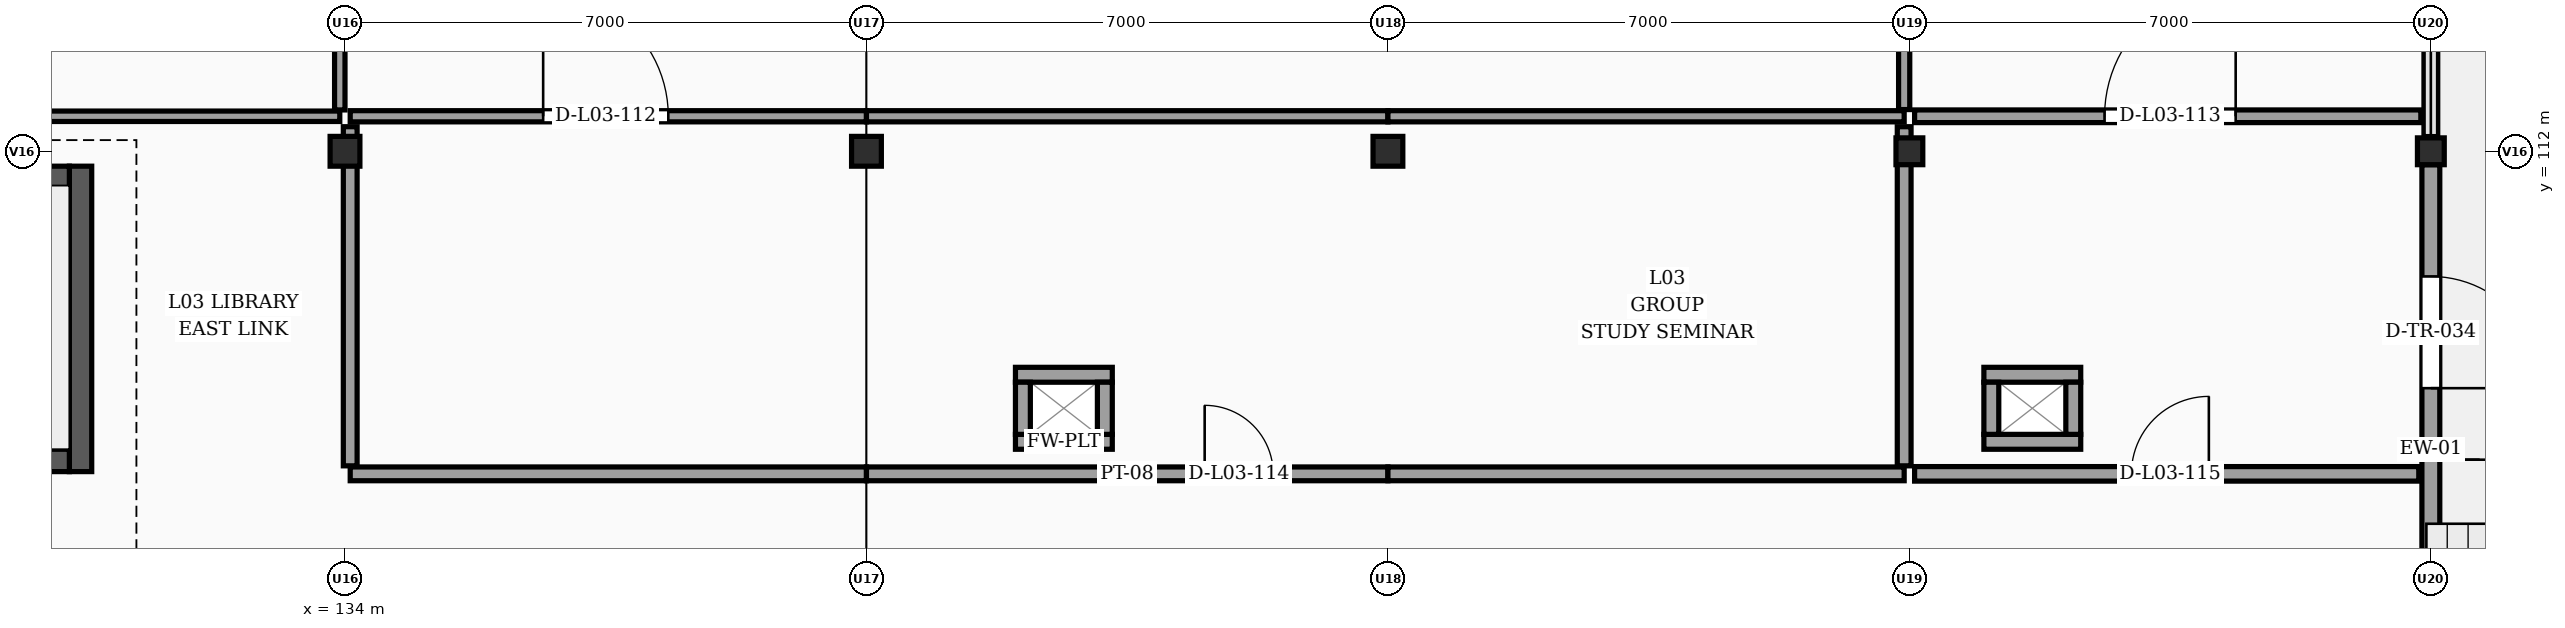
"""IFC4 building model, lengths in metres.
Left out: names, types, materials, properties, quantities, classifications, styles, units other than length and angle.
Written with IfcOpenShell. Run it as: python <this file> out.ifc"""

import sys

from ifc_helpers import new_model, si_unit, direction, frame, frame_2d, origin, origin_2d, place, context, subcontext, project, spatial, rectangle, extrude, element, fill, save


model = new_model("IFC4")
c1 = context("Model", 3, precision=1e-05, world=origin(), true_north=direction((0.0, 1.0)))
c2 = subcontext(c1, "Body", "Model", "MODEL_VIEW")
j1 = project(units=[si_unit("LENGTHUNIT", "METRE"), si_unit("PLANEANGLEUNIT", "RADIAN")], contexts=[c1])
p1 = place(None, origin())
s1 = spatial("IfcSite", under=j1, at=p1, CompositionType="ELEMENT")
p2 = place(p1, origin())
s2 = spatial("IfcBuilding", under=s1, at=p2, CompositionType="ELEMENT")
p3 = place(p2, frame((0.0, 0.0, 12.3)))
s3 = spatial("IfcBuildingStorey", under=s2, at=p3, CompositionType="ELEMENT", Elevation=12.3)
for number, where, z_axis, x_axis in (
    (1, (134.0, 112.0, 0.0), (0.0, 0.0, 1.0), (1.0, 0.0, 0.0)),
    (2, (141.0, 112.0, 0.0), (0.0, 0.0, 1.0), (1.0, 0.0, 0.0)),
    (3, (148.0, 112.0, 0.0), (0.0, 0.0, 1.0), (1.0, 0.0, 0.0)),
):
    element("IfcColumn", number, at=place(p3, frame(where, z_axis=z_axis, x_axis=x_axis)), inside=s3, PredefinedType="COLUMN", context=c2, shape_type="SweptSolid", body=[
        extrude(rectangle(XDim=0.4, YDim=0.4, at=origin_2d()), origin(), (0.0, 0.0, 1.0), 3.9),
    ])
for number, where, z_axis, x_axis in (
    (4, (155.0, 112.0, 0.0), (0.0, 0.0, 1.0), (1.0, 0.0, 0.0)),
    (5, (162.0, 112.0, 0.0), (0.0, 0.0, 1.0), (1.0, 0.0, 0.0)),
):
    element("IfcColumn", number, at=place(p3, frame(where, z_axis=z_axis, x_axis=x_axis)), inside=s3, PredefinedType="COLUMN", context=c2, shape_type="SweptSolid", body=[
        extrude(rectangle(XDim=0.36, YDim=0.36, at=origin_2d()), origin(), (0.0, 0.0, 1.0), 3.9),
    ])
p4 = place(p3, frame((162.0, 119.82, 0.0), z_axis=(0.0, 0.0, 1.0), x_axis=(0.0, -1.0, 0.0)))
e6 = element("IfcWall", 6, at=p4, inside=s3, PredefinedType="SOLIDWALL", context=c2, shape_type="SweptSolid", body=[
    extrude(rectangle(XDim=7.64, YDim=0.185, at=frame_2d((3.82, 0.0))), origin(), (0.0, 0.0, 1.0), 0.95),
])
p5 = place(p3, frame((162.0, 111.82, 0.0), z_axis=(0.0, 0.0, 1.0), x_axis=(0.0, -1.0, 0.0)))
e7 = element("IfcWall", 7, at=p5, inside=s3, PredefinedType="SOLIDWALL", context=c2, shape_type="SweptSolid", body=[
    extrude(rectangle(XDim=7.64, YDim=0.24, at=frame_2d((3.82, 0.0))), origin(), (0.0, 0.0, 1.0), 3.65),
])
p6 = place(p5, frame((1.5, 0.0, 0.0)))
e8 = element("IfcOpeningElement", 8, at=p6, cuts=e7, PredefinedType="OPENING", context=c2, shape_type="SweptSolid", body=[
    extrude(rectangle(XDim=1.5, YDim=2.15, at=frame_2d((0.75, 1.075))), frame((0.0, 0.13, 0.0), z_axis=(0.0, -1.0, 0.0), x_axis=(1.0, 0.0, 0.0)), (0.0, 0.0, 1.0), 0.26),
])
p7 = place(p3, frame((130.45, 111.8, 0.0), z_axis=(0.0, 0.0, 1.0), x_axis=(0.0, -1.0, 0.0)))
e9 = element("IfcWall", 9, at=p7, inside=s3, PredefinedType="SHEAR", context=c2, shape_type="SweptSolid", body=[
    extrude(rectangle(XDim=4.1, YDim=0.3, at=frame_2d((2.05, 0.0))), origin(), (0.0, 0.0, 1.0), 3.65),
])
p8 = place(p3, frame((123.5, 107.85, 0.0), z_axis=(0.0, 0.0, 1.0), x_axis=(1.0, 0.0, 0.0)))
e10 = element("IfcWall", 10, at=p8, inside=s3, PredefinedType="SHEAR", context=c2, shape_type="SweptSolid", body=[
    extrude(rectangle(XDim=6.8, YDim=0.3, at=frame_2d((3.4, 0.0))), origin(), (0.0, 0.0, 1.0), 3.65),
])
p9 = place(p8, frame((0.3, 0.0, 0.0)))
e11 = element("IfcOpeningElement", 11, at=p9, cuts=e10, PredefinedType="OPENING", context=c2, shape_type="SweptSolid", body=[
    extrude(rectangle(XDim=1.1, YDim=2.15, at=frame_2d((0.55, 1.075))), frame((0.0, 0.16, 0.0), z_axis=(0.0, -1.0, 0.0), x_axis=(1.0, 0.0, 0.0)), (0.0, 0.0, 1.0), 0.32),
])
p10 = place(p3, frame((130.3, 111.65, 0.0), z_axis=(0.0, 0.0, 1.0), x_axis=(-1.0, 0.0, 0.0)))
e12 = element("IfcWall", 12, at=p10, inside=s3, PredefinedType="SHEAR", context=c2, shape_type="SweptSolid", body=[
    extrude(rectangle(XDim=6.8, YDim=0.3, at=frame_2d((3.4, 0.0))), origin(), (0.0, 0.0, 1.0), 3.65),
])
for number, where, z_axis, x_axis in (
    (13, (144.3, 108.1, 0.0), (0.0, 0.0, 1.0), (-1.0, 0.0, 0.0)),
    (14, (143.0, 109.0, 0.0), (0.0, 0.0, 1.0), (1.0, 0.0, 0.0)),
):
    element("IfcWall", number, at=place(p3, frame(where, z_axis=z_axis, x_axis=x_axis)), inside=s3, PredefinedType="PARTITIONING", context=c2, shape_type="SweptSolid", body=[
        extrude(rectangle(XDim=1.3, YDim=0.2, at=frame_2d((0.65, 0.0))), origin(), (0.0, 0.0, 1.0), 3.65),
    ])
p11 = place(p3, frame((143.1, 108.2, 0.0), z_axis=(0.0, 0.0, 1.0), x_axis=(0.0, 1.0, 0.0)))
e15 = element("IfcWall", 15, at=p11, inside=s3, PredefinedType="PARTITIONING", context=c2, shape_type="SweptSolid", body=[
    extrude(rectangle(XDim=0.7, YDim=0.2, at=frame_2d((0.35, 0.0))), origin(), (0.0, 0.0, 1.0), 3.245),
])
p12 = place(p3, frame((144.2, 108.9, 0.0), z_axis=(0.0, 0.0, 1.0), x_axis=(0.0, -1.0, 0.0)))
e16 = element("IfcWall", 16, at=p12, inside=s3, PredefinedType="PARTITIONING", context=c2, shape_type="SweptSolid", body=[
    extrude(rectangle(XDim=0.7, YDim=0.2, at=frame_2d((0.35, 0.0))), origin(), (0.0, 0.0, 1.0), 3.65),
])
for number, where, z_axis, x_axis in (
    (17, (157.3, 108.1, 0.0), (0.0, 0.0, 1.0), (-1.0, 0.0, 0.0)),
    (18, (156.0, 109.0, 0.0), (0.0, 0.0, 1.0), (1.0, 0.0, 0.0)),
):
    element("IfcWall", number, at=place(p3, frame(where, z_axis=z_axis, x_axis=x_axis)), inside=s3, PredefinedType="PARTITIONING", context=c2, shape_type="SweptSolid", body=[
        extrude(rectangle(XDim=1.3, YDim=0.2, at=frame_2d((0.65, 0.0))), origin(), (0.0, 0.0, 1.0), 3.65),
    ])
p13 = place(p3, frame((156.1, 108.2, 0.0), z_axis=(0.0, 0.0, 1.0), x_axis=(0.0, 1.0, 0.0)))
e19 = element("IfcWall", 19, at=p13, inside=s3, PredefinedType="PARTITIONING", context=c2, shape_type="SweptSolid", body=[
    extrude(rectangle(XDim=0.7, YDim=0.2, at=frame_2d((0.35, 0.0))), origin(), (0.0, 0.0, 1.0), 3.65),
])
p14 = place(p3, frame((157.2, 108.9, 0.0), z_axis=(0.0, 0.0, 1.0), x_axis=(0.0, -1.0, 0.0)))
e20 = element("IfcWall", 20, at=p14, inside=s3, PredefinedType="PARTITIONING", context=c2, shape_type="SweptSolid", body=[
    extrude(rectangle(XDim=0.7, YDim=0.2, at=frame_2d((0.35, 0.0))), origin(), (0.0, 0.0, 1.0), 3.248),
])
p15 = place(p3, frame((127.0, 112.47, 0.0), z_axis=(0.0, 0.0, 1.0), x_axis=(1.0, 0.0, 0.0)))
e21 = element("IfcWall", 21, at=p15, inside=s3, PredefinedType="PARTITIONING", context=c2, shape_type="SweptSolid", body=[
    extrude(rectangle(XDim=6.93, YDim=0.14, at=frame_2d((3.465, 0.0))), origin(), (0.0, 0.0, 1.0), 3.65),
])
p16 = place(p3, frame((133.93, 112.555, 0.0), z_axis=(0.0, 0.0, 1.0), x_axis=(0.0, 1.0, 0.0)))
e22 = element("IfcWall", 22, at=p16, inside=s3, PredefinedType="PARTITIONING", context=c2, shape_type="SweptSolid", body=[
    extrude(rectangle(XDim=8.275, YDim=0.14, at=frame_2d((4.137, 0.0))), origin(), (0.0, 0.0, 1.0), 3.085),
])
p17 = place(p3, frame((134.07, 112.47, 0.0), z_axis=(0.0, 0.0, 1.0), x_axis=(1.0, 0.0, 0.0)))
e23 = element("IfcWall", 23, at=p17, inside=s3, PredefinedType="PARTITIONING", context=c2, shape_type="SweptSolid", body=[
    extrude(rectangle(XDim=6.93, YDim=0.15, at=frame_2d((3.465, 0.0))), origin(), (0.0, 0.0, 1.0), 3.65),
])
p18 = place(p17, frame((2.59, 0.0, 0.0)))
e24 = element("IfcOpeningElement", 24, at=p18, cuts=e23, PredefinedType="OPENING", context=c2, shape_type="SweptSolid", body=[
    extrude(rectangle(XDim=1.68, YDim=2.2, at=frame_2d((0.84, 1.1))), frame((0.0, 0.085, 0.0), z_axis=(0.0, -1.0, 0.0), x_axis=(1.0, 0.0, 0.0)), (0.0, 0.0, 1.0), 0.17),
])
p19 = place(p3, frame((141.0, 112.47, 0.0), z_axis=(0.0, 0.0, 1.0), x_axis=(1.0, 0.0, 0.0)))
e25 = element("IfcWall", 25, at=p19, inside=s3, PredefinedType="PARTITIONING", context=c2, shape_type="SweptSolid", body=[
    extrude(rectangle(XDim=7.0, YDim=0.15, at=frame_2d((3.5, 0.0))), origin(), (0.0, 0.0, 1.0), 3.65),
])
p20 = place(p3, frame((148.0, 112.47, 0.0), z_axis=(0.0, 0.0, 1.0), x_axis=(1.0, 0.0, 0.0)))
e26 = element("IfcWall", 26, at=p20, inside=s3, PredefinedType="PARTITIONING", context=c2, shape_type="SweptSolid", body=[
    extrude(rectangle(XDim=6.93, YDim=0.15, at=frame_2d((3.465, 0.0))), origin(), (0.0, 0.0, 1.0), 3.65),
])
p21 = place(p3, frame((154.93, 112.56, 0.0), z_axis=(0.0, 0.0, 1.0), x_axis=(0.0, 1.0, 0.0)))
e27 = element("IfcWall", 27, at=p21, inside=s3, PredefinedType="PARTITIONING", context=c2, shape_type="SweptSolid", body=[
    extrude(rectangle(XDim=9.536, YDim=0.15, at=frame_2d((4.768, 0.0))), origin(), (0.0, 0.0, 1.0), 3.088),
])
p22 = place(p3, frame((155.07, 112.47, 0.0), z_axis=(0.0, 0.0, 1.0), x_axis=(1.0, 0.0, 0.0)))
e28 = element("IfcWall", 28, at=p22, inside=s3, PredefinedType="PARTITIONING", context=c2, shape_type="SweptSolid", body=[
    extrude(rectangle(XDim=6.795, YDim=0.17, at=frame_2d((3.398, 0.0))), origin(), (0.0, 0.0, 1.0), 3.65),
])
p23 = place(p22, frame((2.55, 0.0, 0.0)))
e29 = element("IfcOpeningElement", 29, at=p23, cuts=e28, PredefinedType="OPENING", context=c2, shape_type="SweptSolid", body=[
    extrude(rectangle(XDim=1.76, YDim=2.2, at=frame_2d((0.88, 1.1))), frame((0.0, 0.095, 0.0), z_axis=(0.0, -1.0, 0.0), x_axis=(1.0, 0.0, 0.0)), (0.0, 0.0, 1.0), 0.19),
])
p24 = place(p3, frame((134.07, 107.67, 0.0), z_axis=(0.0, 0.0, 1.0), x_axis=(1.0, 0.0, 0.0)))
e30 = element("IfcWall", 30, at=p24, inside=s3, PredefinedType="PARTITIONING", context=c2, shape_type="SweptSolid", body=[
    extrude(rectangle(XDim=6.93, YDim=0.185, at=frame_2d((3.465, 0.0))), origin(), (0.0, 0.0, 1.0), 3.65),
])
p25 = place(p3, frame((141.0, 107.67, 0.0), z_axis=(0.0, 0.0, 1.0), x_axis=(1.0, 0.0, 0.0)))
e31 = element("IfcWall", 31, at=p25, inside=s3, PredefinedType="PARTITIONING", context=c2, shape_type="SweptSolid", body=[
    extrude(rectangle(XDim=7.0, YDim=0.185, at=frame_2d((3.5, 0.0))), origin(), (0.0, 0.0, 1.0), 3.65),
])
p26 = place(p25, frame((4.54, 0.0, 0.0)))
e32 = element("IfcOpeningElement", 32, at=p26, cuts=e31, PredefinedType="OPENING", context=c2, shape_type="SweptSolid", body=[
    extrude(rectangle(XDim=0.92, YDim=2.2, at=frame_2d((0.46, 1.1))), frame((0.0, 0.103, 0.0), z_axis=(0.0, -1.0, 0.0), x_axis=(1.0, 0.0, 0.0)), (0.0, 0.0, 1.0), 0.205),
])
p27 = place(p3, frame((148.0, 107.67, 0.0), z_axis=(0.0, 0.0, 1.0), x_axis=(1.0, 0.0, 0.0)))
e33 = element("IfcWall", 33, at=p27, inside=s3, PredefinedType="PARTITIONING", context=c2, shape_type="SweptSolid", body=[
    extrude(rectangle(XDim=6.93, YDim=0.185, at=frame_2d((3.465, 0.0))), origin(), (0.0, 0.0, 1.0), 3.65),
])
p28 = place(p3, frame((134.07, 107.778, 0.0), z_axis=(0.0, 0.0, 1.0), x_axis=(0.0, 1.0, 0.0)))
e34 = element("IfcWall", 34, at=p28, inside=s3, PredefinedType="PARTITIONING", context=c2, shape_type="SweptSolid", body=[
    extrude(rectangle(XDim=4.552, YDim=0.185, at=frame_2d((2.276, 0.0))), origin(), (0.0, 0.0, 1.0), 3.085),
])
p29 = place(p3, frame((154.93, 107.778, 0.0), z_axis=(0.0, 0.0, 1.0), x_axis=(0.0, 1.0, 0.0)))
e35 = element("IfcWall", 35, at=p29, inside=s3, PredefinedType="PARTITIONING", context=c2, shape_type="SweptSolid", body=[
    extrude(rectangle(XDim=4.552, YDim=0.185, at=frame_2d((2.276, 0.0))), origin(), (0.0, 0.0, 1.0), 3.088),
])
p30 = place(p3, frame((155.07, 107.67, 0.0), z_axis=(0.0, 0.0, 1.0), x_axis=(1.0, 0.0, 0.0)))
e36 = element("IfcWall", 36, at=p30, inside=s3, PredefinedType="PARTITIONING", context=c2, shape_type="SweptSolid", body=[
    extrude(rectangle(XDim=6.768, YDim=0.195, at=frame_2d((3.384, 0.0))), origin(), (0.0, 0.0, 1.0), 3.65),
])
p31 = place(p30, frame((2.91, 0.0, 0.0)))
e37 = element("IfcOpeningElement", 37, at=p31, cuts=e36, PredefinedType="OPENING", context=c2, shape_type="SweptSolid", body=[
    extrude(rectangle(XDim=1.04, YDim=2.25, at=frame_2d((0.52, 1.125))), frame((0.0, 0.107, 0.0), z_axis=(0.0, -1.0, 0.0), x_axis=(1.0, 0.0, 0.0)), (0.0, 0.0, 1.0), 0.215),
])
p32 = place(p6, origin())
e38 = element("IfcDoor", 38, at=p32, inside=s3, OperationType="SINGLE_SWING_RIGHT", PredefinedType="DOOR", context=c2, shape_type="SweptSolid", body=[
    extrude(rectangle(XDim=1.5, YDim=2.15, at=frame_2d((0.75, 1.075))), frame((0.0, 0.025, 0.0), z_axis=(0.0, -1.0, 0.0), x_axis=(1.0, 0.0, 0.0)), (0.0, 0.0, 1.0), 0.05),
])
fill(e8, e38)
p33 = place(p18, origin())
e39 = element("IfcDoor", 39, at=p33, inside=s3, OperationType="SINGLE_SWING_LEFT", PredefinedType="DOOR", context=c2, shape_type="SweptSolid", body=[
    extrude(rectangle(XDim=1.68, YDim=2.2, at=frame_2d((0.84, 1.1))), frame((0.0, 0.025, 0.0), z_axis=(0.0, -1.0, 0.0), x_axis=(1.0, 0.0, 0.0)), (0.0, 0.0, 1.0), 0.05),
])
fill(e24, e39)
p34 = place(p23, origin())
e40 = element("IfcDoor", 40, at=p34, inside=s3, OperationType="SINGLE_SWING_RIGHT", PredefinedType="DOOR", context=c2, shape_type="SweptSolid", body=[
    extrude(rectangle(XDim=1.76, YDim=2.2, at=frame_2d((0.88, 1.1))), frame((0.0, 0.025, 0.0), z_axis=(0.0, -1.0, 0.0), x_axis=(1.0, 0.0, 0.0)), (0.0, 0.0, 1.0), 0.05),
])
fill(e29, e40)
p35 = place(p26, origin())
e41 = element("IfcDoor", 41, at=p35, inside=s3, OperationType="SINGLE_SWING_LEFT", PredefinedType="DOOR", context=c2, shape_type="SweptSolid", body=[
    extrude(rectangle(XDim=0.92, YDim=2.2, at=frame_2d((0.46, 1.1))), frame((0.0, 0.025, 0.0), z_axis=(0.0, -1.0, 0.0), x_axis=(1.0, 0.0, 0.0)), (0.0, 0.0, 1.0), 0.05),
])
fill(e32, e41)
p36 = place(p31, origin())
e42 = element("IfcDoor", 42, at=p36, inside=s3, OperationType="SINGLE_SWING_RIGHT", PredefinedType="DOOR", context=c2, shape_type="SweptSolid", body=[
    extrude(rectangle(XDim=1.04, YDim=2.25, at=frame_2d((0.52, 1.125))), frame((0.0, 0.025, 0.0), z_axis=(0.0, -1.0, 0.0), x_axis=(1.0, 0.0, 0.0)), (0.0, 0.0, 1.0), 0.05),
])
fill(e37, e42)
save(model, sys.argv[1])
